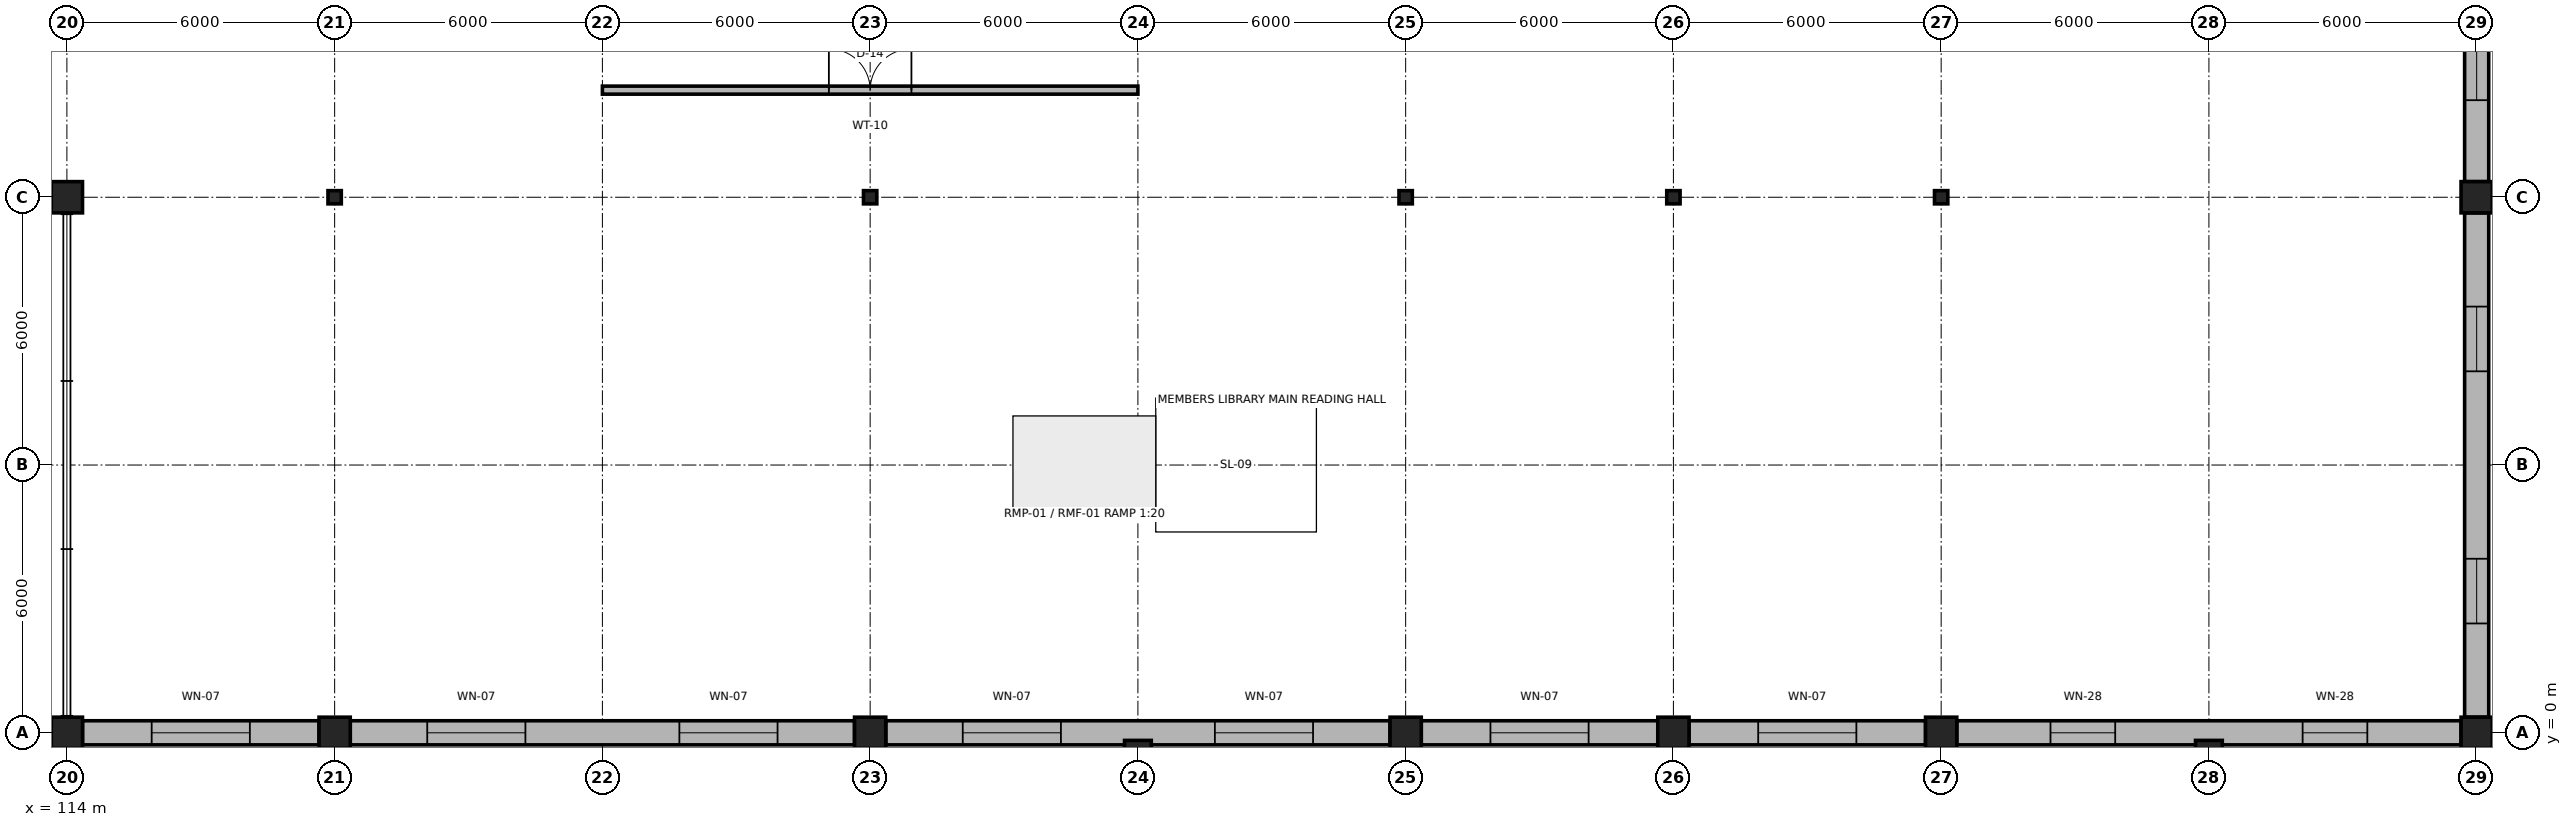
"""IFC4 building model, lengths in metres.
Left out: names, types, materials, properties, quantities, classifications, styles, units other than length and angle.
Written with IfcOpenShell. Run it as: python <this file> out.ifc"""

import sys

from ifc_helpers import new_model, si_unit, direction, frame, frame_2d, origin, origin_2d, place, context, subcontext, project, spatial, rectangle, i_section, extrude, element, fill, save


model = new_model("IFC4")
c1 = context("Model", 3, precision=1e-05, world=origin(), true_north=direction((0.0, 1.0)))
c2 = subcontext(c1, "Body", "Model", "MODEL_VIEW")
j1 = project(units=[si_unit("LENGTHUNIT", "METRE"), si_unit("PLANEANGLEUNIT", "RADIAN")], contexts=[c1])
p1 = place(None, origin())
s1 = spatial("IfcSite", under=j1, at=p1, CompositionType="ELEMENT")
p2 = place(p1, origin())
s2 = spatial("IfcBuilding", under=s1, at=p2, CompositionType="ELEMENT")
p3 = place(p2, frame((0.0, 0.0, 12.0)))
s3 = spatial("IfcBuildingStorey", under=s2, at=p3, CompositionType="ELEMENT", Elevation=12.0)
for number, where, z_axis, x_axis in (
    (1, (114.0, 0.0, 0.0), (0.0, 0.0, 1.0), (1.0, 0.0, 0.0)),
    (2, (120.0, 0.0, 0.0), (0.0, 0.0, 1.0), (1.0, 0.0, 0.0)),
    (3, (132.0, 0.0, 0.0), (0.0, 0.0, 1.0), (1.0, 0.0, 0.0)),
    (4, (144.0, 0.0, 0.0), (0.0, 0.0, 1.0), (1.0, 0.0, 0.0)),
    (5, (150.0, 0.0, 0.0), (0.0, 0.0, 1.0), (1.0, 0.0, 0.0)),
    (6, (156.0, 0.0, 0.0), (0.0, 0.0, 1.0), (1.0, 0.0, 0.0)),
    (7, (168.0, 0.0, 0.0), (0.0, 0.0, 1.0), (1.0, 0.0, 0.0)),
    (8, (114.0, 12.0, 0.0), (0.0, 0.0, 1.0), (1.0, 0.0, 0.0)),
):
    element("IfcColumn", number, at=place(p3, frame(where, z_axis=z_axis, x_axis=x_axis)), inside=s3, PredefinedType="COLUMN", context=c2, shape_type="SweptSolid", body=[
        extrude(rectangle(XDim=0.7, YDim=0.7, at=origin_2d()), origin(), (0.0, 0.0, 1.0), 4.5),
    ])
for number, where, z_axis, x_axis in (
    (9, (120.0, 12.0, 0.0), (0.0, 0.0, 1.0), (1.0, 0.0, 0.0)),
    (10, (132.0, 12.0, 0.0), (0.0, 0.0, 1.0), (1.0, 0.0, 0.0)),
    (11, (144.0, 12.0, 0.0), (0.0, 0.0, 1.0), (1.0, 0.0, 0.0)),
    (12, (150.0, 12.0, 0.0), (0.0, 0.0, 1.0), (1.0, 0.0, 0.0)),
    (13, (156.0, 12.0, 0.0), (0.0, 0.0, 1.0), (1.0, 0.0, 0.0)),
):
    element("IfcColumn", number, at=place(p3, frame(where, z_axis=z_axis, x_axis=x_axis)), inside=s3, PredefinedType="COLUMN", context=c2, shape_type="SweptSolid", body=[
        extrude(i_section(OverallWidth=0.299, OverallDepth=0.296, WebThickness=0.009, FlangeThickness=0.014, FilletRadius=0.018, at=origin_2d()), origin(), (0.0, 0.0, 1.0), 4.5),
    ])
p4 = place(p3, frame((168.0, 12.0, 0.0), z_axis=(0.0, 0.0, 1.0), x_axis=(1.0, 0.0, 0.0)))
e14 = element("IfcColumn", 14, at=p4, inside=s3, PredefinedType="COLUMN", context=c2, shape_type="SweptSolid", body=[
    extrude(rectangle(XDim=0.7, YDim=0.7, at=origin_2d()), origin(), (0.0, 0.0, 1.0), 4.5),
])
for number, where, z_axis, x_axis in (
    (15, (138.0, -0.35, 0.0), (0.0, 0.0, 1.0), (1.0, 0.0, 0.0)),
    (16, (162.0, -0.35, 0.0), (0.0, 0.0, 1.0), (1.0, 0.0, 0.0)),
):
    element("IfcColumn", number, at=place(p3, frame(where, z_axis=z_axis, x_axis=x_axis)), inside=s3, PredefinedType="PILASTER", context=c2, shape_type="SweptSolid", body=[
        extrude(rectangle(XDim=0.6, YDim=0.36, at=origin_2d()), origin(), (0.0, 0.0, 1.0), 4.22),
    ])
p5 = place(p3, frame((114.35, 0.0, 0.0), z_axis=(0.0, 0.0, 1.0), x_axis=(1.0, 0.0, 0.0)))
e17 = element("IfcWall", 17, at=p5, inside=s3, PredefinedType="SOLIDWALL", context=c2, shape_type="SweptSolid", body=[
    extrude(rectangle(XDim=5.3, YDim=0.54, at=frame_2d((2.65, 0.0))), origin(), (0.0, 0.0, 1.0), 3.77),
])
p6 = place(p5, frame((1.55, 0.0, 0.85)))
e18 = element("IfcOpeningElement", 18, at=p6, cuts=e17, PredefinedType="OPENING", context=c2, shape_type="SweptSolid", body=[
    extrude(rectangle(XDim=2.2, YDim=2.4, at=frame_2d((1.1, 1.2))), frame((0.0, 0.285, 0.0), z_axis=(0.0, -1.0, 0.0), x_axis=(1.0, 0.0, 0.0)), (0.0, 0.0, 1.0), 0.57),
])
p7 = place(p3, frame((120.35, 0.0, 0.0), z_axis=(0.0, 0.0, 1.0), x_axis=(1.0, 0.0, 0.0)))
e19 = element("IfcWall", 19, at=p7, inside=s3, PredefinedType="SOLIDWALL", context=c2, shape_type="SweptSolid", body=[
    extrude(rectangle(XDim=11.3, YDim=0.54, at=frame_2d((5.65, 0.0))), origin(), (0.0, 0.0, 1.0), 3.77),
])
p8 = place(p7, frame((1.725, 0.0, 0.85)))
e20 = element("IfcOpeningElement", 20, at=p8, cuts=e19, PredefinedType="OPENING", context=c2, shape_type="SweptSolid", body=[
    extrude(rectangle(XDim=2.2, YDim=2.4, at=frame_2d((1.1, 1.2))), frame((0.0, 0.285, 0.0), z_axis=(0.0, -1.0, 0.0), x_axis=(1.0, 0.0, 0.0)), (0.0, 0.0, 1.0), 0.57),
])
p9 = place(p7, frame((7.375, 0.0, 0.85)))
e21 = element("IfcOpeningElement", 21, at=p9, cuts=e19, PredefinedType="OPENING", context=c2, shape_type="SweptSolid", body=[
    extrude(rectangle(XDim=2.2, YDim=2.4, at=frame_2d((1.1, 1.2))), frame((0.0, 0.285, 0.0), z_axis=(0.0, -1.0, 0.0), x_axis=(1.0, 0.0, 0.0)), (0.0, 0.0, 1.0), 0.57),
])
p10 = place(p3, frame((132.35, 0.0, 0.0), z_axis=(0.0, 0.0, 1.0), x_axis=(1.0, 0.0, 0.0)))
e22 = element("IfcWall", 22, at=p10, inside=s3, PredefinedType="SOLIDWALL", context=c2, shape_type="SweptSolid", body=[
    extrude(rectangle(XDim=11.3, YDim=0.54, at=frame_2d((5.65, 0.0))), origin(), (0.0, 0.0, 1.0), 3.77),
])
p11 = place(p10, frame((1.725, 0.0, 0.85)))
e23 = element("IfcOpeningElement", 23, at=p11, cuts=e22, PredefinedType="OPENING", context=c2, shape_type="SweptSolid", body=[
    extrude(rectangle(XDim=2.2, YDim=2.4, at=frame_2d((1.1, 1.2))), frame((0.0, 0.285, 0.0), z_axis=(0.0, -1.0, 0.0), x_axis=(1.0, 0.0, 0.0)), (0.0, 0.0, 1.0), 0.57),
])
p12 = place(p10, frame((7.375, 0.0, 0.85)))
e24 = element("IfcOpeningElement", 24, at=p12, cuts=e22, PredefinedType="OPENING", context=c2, shape_type="SweptSolid", body=[
    extrude(rectangle(XDim=2.2, YDim=2.4, at=frame_2d((1.1, 1.2))), frame((0.0, 0.285, 0.0), z_axis=(0.0, -1.0, 0.0), x_axis=(1.0, 0.0, 0.0)), (0.0, 0.0, 1.0), 0.57),
])
p13 = place(p3, frame((144.35, 0.0, 0.0), z_axis=(0.0, 0.0, 1.0), x_axis=(1.0, 0.0, 0.0)))
e25 = element("IfcWall", 25, at=p13, inside=s3, PredefinedType="SOLIDWALL", context=c2, shape_type="SweptSolid", body=[
    extrude(rectangle(XDim=5.3, YDim=0.54, at=frame_2d((2.65, 0.0))), origin(), (0.0, 0.0, 1.0), 3.77),
])
p14 = place(p13, frame((1.55, 0.0, 0.85)))
e26 = element("IfcOpeningElement", 26, at=p14, cuts=e25, PredefinedType="OPENING", context=c2, shape_type="SweptSolid", body=[
    extrude(rectangle(XDim=2.2, YDim=2.4, at=frame_2d((1.1, 1.2))), frame((0.0, 0.285, 0.0), z_axis=(0.0, -1.0, 0.0), x_axis=(1.0, 0.0, 0.0)), (0.0, 0.0, 1.0), 0.57),
])
p15 = place(p3, frame((150.35, 0.0, 0.0), z_axis=(0.0, 0.0, 1.0), x_axis=(1.0, 0.0, 0.0)))
e27 = element("IfcWall", 27, at=p15, inside=s3, PredefinedType="SOLIDWALL", context=c2, shape_type="SweptSolid", body=[
    extrude(rectangle(XDim=5.3, YDim=0.54, at=frame_2d((2.65, 0.0))), origin(), (0.0, 0.0, 1.0), 3.77),
])
p16 = place(p15, frame((1.55, 0.0, 0.85)))
e28 = element("IfcOpeningElement", 28, at=p16, cuts=e27, PredefinedType="OPENING", context=c2, shape_type="SweptSolid", body=[
    extrude(rectangle(XDim=2.2, YDim=2.4, at=frame_2d((1.1, 1.2))), frame((0.0, 0.285, 0.0), z_axis=(0.0, -1.0, 0.0), x_axis=(1.0, 0.0, 0.0)), (0.0, 0.0, 1.0), 0.57),
])
p17 = place(p3, frame((156.35, 0.0, 0.0), z_axis=(0.0, 0.0, 1.0), x_axis=(1.0, 0.0, 0.0)))
e29 = element("IfcWall", 29, at=p17, inside=s3, PredefinedType="SOLIDWALL", context=c2, shape_type="SweptSolid", body=[
    extrude(rectangle(XDim=11.3, YDim=0.54, at=frame_2d((5.65, 0.0))), origin(), (0.0, 0.0, 1.0), 3.77),
])
p18 = place(p17, frame((2.1, 0.0, 0.85)))
e30 = element("IfcOpeningElement", 30, at=p18, cuts=e29, PredefinedType="OPENING", context=c2, shape_type="SweptSolid", body=[
    extrude(rectangle(XDim=1.45, YDim=2.15, at=frame_2d((0.725, 1.075))), frame((0.0, 0.285, 0.0), z_axis=(0.0, -1.0, 0.0), x_axis=(1.0, 0.0, 0.0)), (0.0, 0.0, 1.0), 0.57),
])
p19 = place(p17, frame((7.75, 0.0, 0.85)))
e31 = element("IfcOpeningElement", 31, at=p19, cuts=e29, PredefinedType="OPENING", context=c2, shape_type="SweptSolid", body=[
    extrude(rectangle(XDim=1.45, YDim=2.15, at=frame_2d((0.725, 1.075))), frame((0.0, 0.285, 0.0), z_axis=(0.0, -1.0, 0.0), x_axis=(1.0, 0.0, 0.0)), (0.0, 0.0, 1.0), 0.57),
])
p20 = place(p3, frame((168.0, 0.35, 0.0), z_axis=(0.0, 0.0, 1.0), x_axis=(0.0, 1.0, 0.0)))
e32 = element("IfcWall", 32, at=p20, inside=s3, PredefinedType="SOLIDWALL", context=c2, shape_type="SweptSolid", body=[
    extrude(rectangle(XDim=11.3, YDim=0.54, at=frame_2d((5.65, 0.0))), origin(), (0.0, 0.0, 1.0), 3.77),
])
p21 = place(p20, frame((2.1, 0.0, 0.85)))
e33 = element("IfcOpeningElement", 33, at=p21, cuts=e32, PredefinedType="OPENING", context=c2, shape_type="SweptSolid", body=[
    extrude(rectangle(XDim=1.45, YDim=2.15, at=frame_2d((0.725, 1.075))), frame((0.0, 0.285, 0.0), z_axis=(0.0, -1.0, 0.0), x_axis=(1.0, 0.0, 0.0)), (0.0, 0.0, 1.0), 0.57),
])
p22 = place(p20, frame((7.75, 0.0, 0.85)))
e34 = element("IfcOpeningElement", 34, at=p22, cuts=e32, PredefinedType="OPENING", context=c2, shape_type="SweptSolid", body=[
    extrude(rectangle(XDim=1.45, YDim=2.15, at=frame_2d((0.725, 1.075))), frame((0.0, 0.285, 0.0), z_axis=(0.0, -1.0, 0.0), x_axis=(1.0, 0.0, 0.0)), (0.0, 0.0, 1.0), 0.57),
])
p23 = place(p3, frame((168.0, 12.35, 0.0), z_axis=(0.0, 0.0, 1.0), x_axis=(0.0, 1.0, 0.0)))
e35 = element("IfcWall", 35, at=p23, inside=s3, PredefinedType="SOLIDWALL", context=c2, shape_type="SweptSolid", body=[
    extrude(rectangle(XDim=5.3, YDim=0.54, at=frame_2d((2.65, 0.0))), origin(), (0.0, 0.0, 1.0), 3.77),
])
p24 = place(p23, frame((1.825, 0.0, 0.85)))
e36 = element("IfcOpeningElement", 36, at=p24, cuts=e35, PredefinedType="OPENING", context=c2, shape_type="SweptSolid", body=[
    extrude(rectangle(XDim=1.65, YDim=2.3, at=frame_2d((0.825, 1.15))), frame((0.0, 0.285, 0.0), z_axis=(0.0, -1.0, 0.0), x_axis=(1.0, 0.0, 0.0)), (0.0, 0.0, 1.0), 0.57),
])
p25 = place(p3, frame((126.0, 14.4, 0.0), z_axis=(0.0, 0.0, 1.0), x_axis=(1.0, 0.0, 0.0)))
e37 = element("IfcWall", 37, at=p25, inside=s3, PredefinedType="PARTITIONING", context=c2, shape_type="SweptSolid", body=[
    extrude(rectangle(XDim=12.0, YDim=0.18, at=frame_2d((6.0, 0.0))), origin(), (0.0, 0.0, 1.0), 4.22),
])
p26 = place(p25, frame((5.075, 0.0, 0.0)))
e38 = element("IfcOpeningElement", 38, at=p26, cuts=e37, PredefinedType="OPENING", context=c2, shape_type="SweptSolid", body=[
    extrude(rectangle(XDim=1.85, YDim=2.65, at=frame_2d((0.925, 1.325))), frame((0.0, 0.105, 0.0), z_axis=(0.0, -1.0, 0.0), x_axis=(1.0, 0.0, 0.0)), (0.0, 0.0, 1.0), 0.21),
])
p27 = place(p6, origin())
e39 = element("IfcWindow", 39, at=p27, inside=s3, PartitioningType="SINGLE_PANEL", PredefinedType="WINDOW", context=c2, shape_type="SweptSolid", body=[
    extrude(rectangle(XDim=2.2, YDim=2.4, at=frame_2d((1.1, 1.2))), frame((0.0, 0.03, 0.0), z_axis=(0.0, -1.0, 0.0), x_axis=(1.0, 0.0, 0.0)), (0.0, 0.0, 1.0), 0.06),
])
fill(e18, e39)
p28 = place(p8, origin())
e40 = element("IfcWindow", 40, at=p28, inside=s3, PartitioningType="SINGLE_PANEL", PredefinedType="WINDOW", context=c2, shape_type="SweptSolid", body=[
    extrude(rectangle(XDim=2.2, YDim=2.4, at=frame_2d((1.1, 1.2))), frame((0.0, 0.03, 0.0), z_axis=(0.0, -1.0, 0.0), x_axis=(1.0, 0.0, 0.0)), (0.0, 0.0, 1.0), 0.06),
])
fill(e20, e40)
p29 = place(p9, origin())
e41 = element("IfcWindow", 41, at=p29, inside=s3, PartitioningType="SINGLE_PANEL", PredefinedType="WINDOW", context=c2, shape_type="SweptSolid", body=[
    extrude(rectangle(XDim=2.2, YDim=2.4, at=frame_2d((1.1, 1.2))), frame((0.0, 0.03, 0.0), z_axis=(0.0, -1.0, 0.0), x_axis=(1.0, 0.0, 0.0)), (0.0, 0.0, 1.0), 0.06),
])
fill(e21, e41)
p30 = place(p11, origin())
e42 = element("IfcWindow", 42, at=p30, inside=s3, PartitioningType="SINGLE_PANEL", PredefinedType="WINDOW", context=c2, shape_type="SweptSolid", body=[
    extrude(rectangle(XDim=2.2, YDim=2.4, at=frame_2d((1.1, 1.2))), frame((0.0, 0.03, 0.0), z_axis=(0.0, -1.0, 0.0), x_axis=(1.0, 0.0, 0.0)), (0.0, 0.0, 1.0), 0.06),
])
fill(e23, e42)
p31 = place(p12, origin())
e43 = element("IfcWindow", 43, at=p31, inside=s3, PartitioningType="SINGLE_PANEL", PredefinedType="WINDOW", context=c2, shape_type="SweptSolid", body=[
    extrude(rectangle(XDim=2.2, YDim=2.4, at=frame_2d((1.1, 1.2))), frame((0.0, 0.03, 0.0), z_axis=(0.0, -1.0, 0.0), x_axis=(1.0, 0.0, 0.0)), (0.0, 0.0, 1.0), 0.06),
])
fill(e24, e43)
p32 = place(p14, origin())
e44 = element("IfcWindow", 44, at=p32, inside=s3, PartitioningType="SINGLE_PANEL", PredefinedType="WINDOW", context=c2, shape_type="SweptSolid", body=[
    extrude(rectangle(XDim=2.2, YDim=2.4, at=frame_2d((1.1, 1.2))), frame((0.0, 0.03, 0.0), z_axis=(0.0, -1.0, 0.0), x_axis=(1.0, 0.0, 0.0)), (0.0, 0.0, 1.0), 0.06),
])
fill(e26, e44)
p33 = place(p16, origin())
e45 = element("IfcWindow", 45, at=p33, inside=s3, PartitioningType="SINGLE_PANEL", PredefinedType="WINDOW", context=c2, shape_type="SweptSolid", body=[
    extrude(rectangle(XDim=2.2, YDim=2.4, at=frame_2d((1.1, 1.2))), frame((0.0, 0.03, 0.0), z_axis=(0.0, -1.0, 0.0), x_axis=(1.0, 0.0, 0.0)), (0.0, 0.0, 1.0), 0.06),
])
fill(e28, e45)
p34 = place(p18, origin())
e46 = element("IfcWindow", 46, at=p34, inside=s3, PartitioningType="SINGLE_PANEL", PredefinedType="WINDOW", context=c2, shape_type="SweptSolid", body=[
    extrude(rectangle(XDim=1.45, YDim=2.15, at=frame_2d((0.725, 1.075))), frame((0.0, 0.03, 0.0), z_axis=(0.0, -1.0, 0.0), x_axis=(1.0, 0.0, 0.0)), (0.0, 0.0, 1.0), 0.06),
])
fill(e30, e46)
p35 = place(p19, origin())
e47 = element("IfcWindow", 47, at=p35, inside=s3, PartitioningType="SINGLE_PANEL", PredefinedType="WINDOW", context=c2, shape_type="SweptSolid", body=[
    extrude(rectangle(XDim=1.45, YDim=2.15, at=frame_2d((0.725, 1.075))), frame((0.0, 0.03, 0.0), z_axis=(0.0, -1.0, 0.0), x_axis=(1.0, 0.0, 0.0)), (0.0, 0.0, 1.0), 0.06),
])
fill(e31, e47)
p36 = place(p21, origin())
e48 = element("IfcWindow", 48, at=p36, inside=s3, PartitioningType="SINGLE_PANEL", PredefinedType="WINDOW", context=c2, shape_type="SweptSolid", body=[
    extrude(rectangle(XDim=1.45, YDim=2.15, at=frame_2d((0.725, 1.075))), frame((0.0, 0.03, 0.0), z_axis=(0.0, -1.0, 0.0), x_axis=(1.0, 0.0, 0.0)), (0.0, 0.0, 1.0), 0.06),
])
fill(e33, e48)
p37 = place(p22, origin())
e49 = element("IfcWindow", 49, at=p37, inside=s3, PartitioningType="SINGLE_PANEL", PredefinedType="WINDOW", context=c2, shape_type="SweptSolid", body=[
    extrude(rectangle(XDim=1.45, YDim=2.15, at=frame_2d((0.725, 1.075))), frame((0.0, 0.03, 0.0), z_axis=(0.0, -1.0, 0.0), x_axis=(1.0, 0.0, 0.0)), (0.0, 0.0, 1.0), 0.06),
])
fill(e34, e49)
p38 = place(p24, origin())
e50 = element("IfcWindow", 50, at=p38, inside=s3, PartitioningType="SINGLE_PANEL", PredefinedType="WINDOW", context=c2, shape_type="SweptSolid", body=[
    extrude(rectangle(XDim=1.65, YDim=2.3, at=frame_2d((0.825, 1.15))), frame((0.0, 0.03, 0.0), z_axis=(0.0, -1.0, 0.0), x_axis=(1.0, 0.0, 0.0)), (0.0, 0.0, 1.0), 0.06),
])
fill(e36, e50)
p39 = place(p26, origin())
e51 = element("IfcDoor", 51, at=p39, inside=s3, OperationType="DOUBLE_DOOR_SINGLE_SWING", PredefinedType="DOOR", context=c2, shape_type="SweptSolid", body=[
    extrude(rectangle(XDim=1.85, YDim=2.65, at=frame_2d((0.925, 1.325))), frame((0.0, 0.025, 0.0), z_axis=(0.0, -1.0, 0.0), x_axis=(1.0, 0.0, 0.0)), (0.0, 0.0, 1.0), 0.05),
])
fill(e38, e51)
save(model, sys.argv[1])
